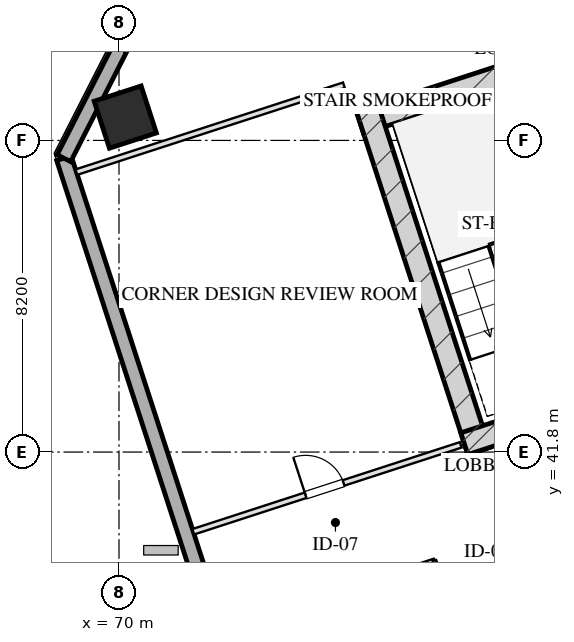
"""IFC4 building model, lengths in metres.
Left out: names, types, materials, properties, quantities, classifications, styles, units other than length and angle.
Written with IfcOpenShell. Run it as: python <this file> out.ifc"""

import sys

from ifc_helpers import new_model, si_unit, direction, frame, frame_2d, origin, origin_2d, place, context, subcontext, project, spatial, rectangle, hollow_rectangle, extrude, element, fill, save


model = new_model("IFC4")
c1 = context("Model", 3, precision=1e-05, world=origin(), true_north=direction((0.0, 1.0)))
c2 = subcontext(c1, "Body", "Model", "MODEL_VIEW")
j1 = project(units=[si_unit("LENGTHUNIT", "METRE"), si_unit("PLANEANGLEUNIT", "RADIAN")], contexts=[c1])
p1 = place(None, origin())
s1 = spatial("IfcSite", under=j1, at=p1, CompositionType="ELEMENT")
p2 = place(p1, origin())
s2 = spatial("IfcBuilding", under=s1, at=p2, CompositionType="ELEMENT")
p3 = place(p2, frame((0.0, 0.0, 142.6)))
s3 = spatial("IfcBuildingStorey", under=s2, at=p3, CompositionType="ELEMENT", Elevation=142.6)
p4 = place(p3, frame((76.344, 50.466, 0.0), z_axis=(0.0, 0.0, 1.0), x_axis=(0.951055727519, 0.309019421968, 0.0)))
e1 = element("IfcWall", 1, at=p4, inside=s3, PredefinedType="SHEAR", context=c2, shape_type="SweptSolid", body=[
    extrude(rectangle(XDim=16.4, YDim=0.6, at=frame_2d((8.2, 0.0))), origin(), (0.0, 0.0, 1.0), 3.45),
])
p5 = place(p3, frame((79.466, 41.828, 0.0), z_axis=(0.0, 0.0, 1.0), x_axis=(-0.309041232772, 0.951048640421, 0.0)))
e2 = element("IfcWall", 2, at=p5, inside=s3, PredefinedType="SHEAR", context=c2, shape_type="SweptSolid", body=[
    extrude(rectangle(XDim=9.48, YDim=0.6, at=frame_2d((4.74, 0.0))), origin(), (0.0, 0.0, 1.0), 3.45),
])
p6 = place(p3, frame((79.087, 42.021, 0.0), z_axis=(0.0, 0.0, 1.0), x_axis=(0.951062550203, 0.3089984233, 0.0)))
e3 = element("IfcWall", 3, at=p6, inside=s3, PredefinedType="SHEAR", context=c2, shape_type="SweptSolid", body=[
    extrude(rectangle(XDim=4.22, YDim=0.6, at=frame_2d((2.11, 0.0))), origin(), (0.0, 0.0, 1.0), 3.45),
])
p7 = place(p3, frame((70.165, 50.614, 0.0), z_axis=(0.0, 0.0, 1.0), x_axis=(0.951056516295, 0.309016994375, 0.0)))
e4 = element("IfcColumn", 4, at=p7, inside=s3, PredefinedType="COLUMN", context=c2, shape_type="SweptSolid", body=[
    extrude(hollow_rectangle(XDim=1.3, YDim=1.3, WallThickness=0.045, at=origin_2d()), origin(), (0.0, 0.0, 1.0), 3.451),
])
p8 = place(p3, frame((81.776, 8.827, 0.0), z_axis=(0.0, 0.0, 1.0), x_axis=(-0.309014228706, 0.951057414911, 0.0)))
e5 = element("IfcWall", 5, at=p8, inside=s3, PredefinedType="SOLIDWALL", context=c2, shape_type="SweptSolid", body=[
    extrude(rectangle(XDim=42.8, YDim=0.4, at=frame_2d((21.4, 0.0))), origin(), (0.0, 0.0, 1.0), 2.61),
])
p9 = place(p8, frame((23.95, 0.0, 0.0)))
e6 = element("IfcOpeningElement", 6, at=p9, cuts=e5, PredefinedType="OPENING", context=c2, shape_type="SweptSolid", body=[
    extrude(rectangle(XDim=1.1, YDim=2.15, at=frame_2d((0.55, 1.075))), frame((0.0, 0.21, 0.0), z_axis=(0.0, -1.0, 0.0), x_axis=(1.0, 0.0, 0.0)), (0.0, 0.0, 1.0), 0.42),
])
p10 = place(p3, frame((68.551, 49.532, 0.0), z_axis=(0.0, 0.0, 1.0), x_axis=(0.454019523198, 0.890991735402, 0.0)))
e7 = element("IfcWall", 7, at=p10, inside=s3, PredefinedType="SOLIDWALL", context=c2, shape_type="SweptSolid", body=[
    extrude(rectangle(XDim=3.394, YDim=0.4, at=frame_2d((1.697, 0.0))), origin(), (0.0, 0.0, 1.0), 2.61),
])
p11 = place(p3, frame((68.88, 49.166, 0.0), z_axis=(0.0, 0.0, 1.0), x_axis=(0.951060977215, 0.309003264738, 0.0)))
e8 = element("IfcWall", 8, at=p11, inside=s3, PredefinedType="PARTITIONING", context=c2, shape_type="SweptSolid", body=[
    extrude(rectangle(XDim=7.4, YDim=0.15, at=frame_2d((3.7, 0.0))), origin(), (0.0, 0.0, 1.0), 3.175),
])
p12 = place(p3, frame((71.955, 39.703, 0.0), z_axis=(0.0, 0.0, 1.0), x_axis=(0.951060977215, 0.309003264738, 0.0)))
e9 = element("IfcWall", 9, at=p12, inside=s3, PredefinedType="PARTITIONING", context=c2, shape_type="SweptSolid", body=[
    extrude(rectangle(XDim=7.4, YDim=0.15, at=frame_2d((3.7, 0.0))), origin(), (0.0, 0.0, 1.0), 3.175),
])
p13 = place(p12, frame((3.108, 0.0, 0.0)))
e10 = element("IfcOpeningElement", 10, at=p13, cuts=e9, PredefinedType="OPENING", context=c2, shape_type="SweptSolid", body=[
    extrude(rectangle(XDim=1.05, YDim=2.05, at=frame_2d((0.525, 1.025))), frame((0.0, 0.085, 0.0), z_axis=(0.0, -1.0, 0.0), x_axis=(1.0, 0.0, 0.0)), (0.0, 0.0, 1.0), 0.17),
])
p14 = place(p3, frame((72.783, 37.154, 0.0), z_axis=(0.0, 0.0, 1.0), x_axis=(0.951047059821, 0.309046096893, 0.0)))
e11 = element("IfcWall", 11, at=p14, inside=s3, PredefinedType="MOVABLE", context=c2, shape_type="SweptSolid", body=[
    extrude(rectangle(XDim=5.8, YDim=0.1, at=frame_2d((2.9, 0.0))), origin(), (0.0, 0.0, 1.0), 3.175),
])
p15 = place(p3, frame((83.441, 23.121, 0.0), z_axis=(0.0, 0.0, 1.0), x_axis=(-0.30901773025, 0.951056277195, 0.0)))
e12 = element("IfcWall", 12, at=p15, inside=s3, PredefinedType="MOVABLE", context=c2, shape_type="SweptSolid", body=[
    extrude(rectangle(XDim=16.64, YDim=0.1, at=frame_2d((8.32, 0.0))), origin(), (0.0, 0.0, 1.0), 3.175),
])
p16 = place(p15, frame((1.143, 0.0, 0.0)))
e13 = element("IfcOpeningElement", 13, at=p16, cuts=e12, PredefinedType="OPENING", context=c2, shape_type="SweptSolid", body=[
    extrude(rectangle(XDim=1.0, YDim=2.05, at=frame_2d((0.5, 1.025))), frame((0.0, 0.06, 0.0), z_axis=(0.0, -1.0, 0.0), x_axis=(1.0, 0.0, 0.0)), (0.0, 0.0, 1.0), 0.12),
])
p17 = place(p15, frame((4.703, 0.0, 0.0)))
e14 = element("IfcOpeningElement", 14, at=p17, cuts=e12, PredefinedType="OPENING", context=c2, shape_type="SweptSolid", body=[
    extrude(rectangle(XDim=1.0, YDim=2.05, at=frame_2d((0.5, 1.025))), frame((0.0, 0.06, 0.0), z_axis=(0.0, -1.0, 0.0), x_axis=(1.0, 0.0, 0.0)), (0.0, 0.0, 1.0), 0.12),
])
p18 = place(p15, frame((7.82, 0.0, 0.0)))
e15 = element("IfcOpeningElement", 15, at=p18, cuts=e12, PredefinedType="OPENING", context=c2, shape_type="SweptSolid", body=[
    extrude(rectangle(XDim=1.0, YDim=2.05, at=frame_2d((0.5, 1.025))), frame((0.0, 0.06, 0.0), z_axis=(0.0, -1.0, 0.0), x_axis=(1.0, 0.0, 0.0)), (0.0, 0.0, 1.0), 0.12),
])
p19 = place(p15, frame((10.92, 0.0, 0.0)))
e16 = element("IfcOpeningElement", 16, at=p19, cuts=e12, PredefinedType="OPENING", context=c2, shape_type="SweptSolid", body=[
    extrude(rectangle(XDim=1.0, YDim=2.05, at=frame_2d((0.5, 1.025))), frame((0.0, 0.06, 0.0), z_axis=(0.0, -1.0, 0.0), x_axis=(1.0, 0.0, 0.0)), (0.0, 0.0, 1.0), 0.12),
])
p20 = place(p15, frame((14.48, 0.0, 0.0)))
e17 = element("IfcOpeningElement", 17, at=p20, cuts=e12, PredefinedType="OPENING", context=c2, shape_type="SweptSolid", body=[
    extrude(rectangle(XDim=0.85, YDim=2.05, at=frame_2d((0.425, 1.025))), frame((0.0, 0.06, 0.0), z_axis=(0.0, -1.0, 0.0), x_axis=(1.0, 0.0, 0.0)), (0.0, 0.0, 1.0), 0.12),
])
p21 = place(p13, origin())
e18 = element("IfcDoor", 18, at=p21, inside=s3, OperationType="SINGLE_SWING_LEFT", PredefinedType="DOOR", context=c2, shape_type="SweptSolid", body=[
    extrude(rectangle(XDim=1.05, YDim=2.05, at=frame_2d((0.525, 1.025))), frame((0.0, 0.025, 0.0), z_axis=(0.0, -1.0, 0.0), x_axis=(1.0, 0.0, 0.0)), (0.0, 0.0, 1.0), 0.05),
])
fill(e10, e18)
save(model, sys.argv[1])
